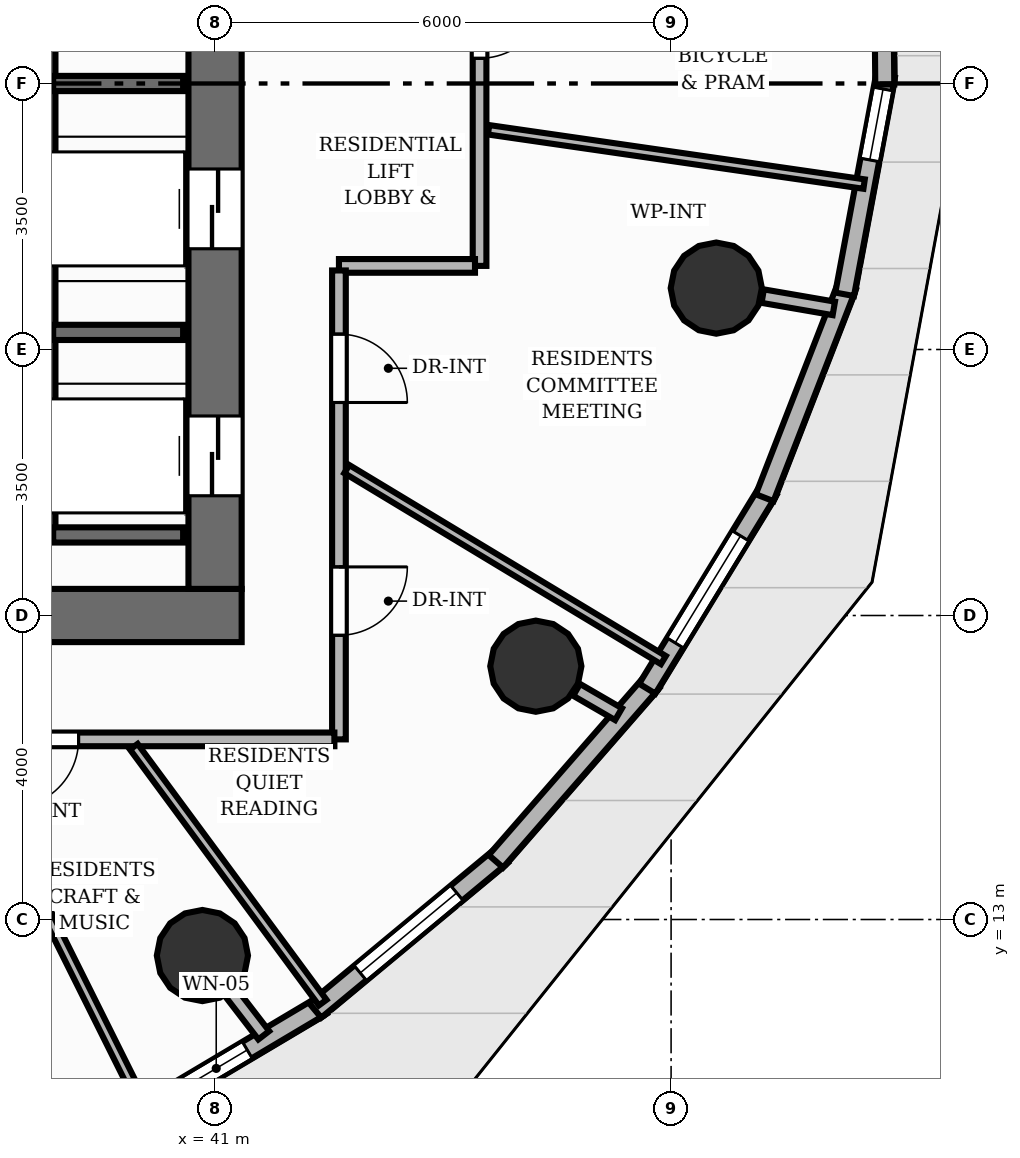
"""IFC4 building model, lengths in metres.
Left out: names, types, materials, properties, quantities, classifications, styles, units other than length and angle.
Written with IfcOpenShell. Run it as: python <this file> out.ifc"""

import sys

from ifc_helpers import new_model, si_unit, direction, frame, frame_2d, origin, origin_2d, place, context, subcontext, project, spatial, rectangle, circle, extrude, element, fill, save


model = new_model("IFC4")
c1 = context("Model", 3, precision=1e-05, world=origin(), true_north=direction((0.0, 1.0)))
c2 = subcontext(c1, "Body", "Model", "MODEL_VIEW")
j1 = project(units=[si_unit("LENGTHUNIT", "METRE"), si_unit("PLANEANGLEUNIT", "RADIAN")], contexts=[c1])
p1 = place(None, origin())
s1 = spatial("IfcSite", under=j1, at=p1, CompositionType="ELEMENT")
p2 = place(p1, origin())
s2 = spatial("IfcBuilding", under=s1, at=p2, CompositionType="ELEMENT")
p3 = place(p2, frame((0.0, 0.0, 74.08)))
s3 = spatial("IfcBuildingStorey", under=s2, at=p3, CompositionType="ELEMENT", Elevation=74.08)
p4 = place(p3, frame((22.65, 17.0, 0.0), z_axis=(0.0, 0.0, 1.0), x_axis=(1.0, 0.0, 0.0)))
e1 = element("IfcWall", 1, at=p4, inside=s3, PredefinedType="SHEAR", context=c2, shape_type="SweptSolid", body=[
    extrude(rectangle(XDim=18.7, YDim=0.7, at=frame_2d((9.35, 0.0))), origin(), (0.0, 0.0, 1.0), 3.2),
])
p5 = place(p4, frame((5.85, 0.0, 0.0)))
e2 = element("IfcOpeningElement", 2, at=p5, cuts=e1, PredefinedType="OPENING", context=c2, shape_type="SweptSolid", body=[
    extrude(rectangle(XDim=1.1, YDim=2.15, at=frame_2d((0.55, 1.075))), frame((0.0, 0.36, 0.0), z_axis=(0.0, -1.0, 0.0), x_axis=(1.0, 0.0, 0.0)), (0.0, 0.0, 1.0), 0.72),
])
p6 = place(p4, frame((9.4, 0.0, 0.0)))
e3 = element("IfcOpeningElement", 3, at=p6, cuts=e1, PredefinedType="OPENING", context=c2, shape_type="SweptSolid", body=[
    extrude(rectangle(XDim=0.9, YDim=2.1, at=frame_2d((0.45, 1.05))), frame((0.0, 0.36, 0.0), z_axis=(0.0, -1.0, 0.0), x_axis=(1.0, 0.0, 0.0)), (0.0, 0.0, 1.0), 0.72),
])
p7 = place(p3, frame((41.0, 17.35, 0.0), z_axis=(0.0, 0.0, 1.0), x_axis=(0.0, 1.0, 0.0)))
e4 = element("IfcWall", 4, at=p7, inside=s3, PredefinedType="SHEAR", context=c2, shape_type="SweptSolid", body=[
    extrude(rectangle(XDim=13.3, YDim=0.7, at=frame_2d((6.65, 0.0))), origin(), (0.0, 0.0, 1.0), 3.2),
])
p8 = place(p7, frame((1.225, 0.0, 0.0)))
e5 = element("IfcOpeningElement", 5, at=p8, cuts=e4, PredefinedType="OPENING", context=c2, shape_type="SweptSolid", body=[
    extrude(rectangle(XDim=1.05, YDim=2.15, at=frame_2d((0.525, 1.075))), frame((0.0, 0.36, 0.0), z_axis=(0.0, -1.0, 0.0), x_axis=(1.0, 0.0, 0.0)), (0.0, 0.0, 1.0), 0.72),
])
p9 = place(p7, frame((4.475, 0.0, 0.0)))
e6 = element("IfcOpeningElement", 6, at=p9, cuts=e4, PredefinedType="OPENING", context=c2, shape_type="SweptSolid", body=[
    extrude(rectangle(XDim=1.05, YDim=2.15, at=frame_2d((0.525, 1.075))), frame((0.0, 0.36, 0.0), z_axis=(0.0, -1.0, 0.0), x_axis=(1.0, 0.0, 0.0)), (0.0, 0.0, 1.0), 0.72),
])
p10 = place(p7, frame((7.775, 0.0, 0.0)))
e7 = element("IfcOpeningElement", 7, at=p10, cuts=e4, PredefinedType="OPENING", context=c2, shape_type="SweptSolid", body=[
    extrude(rectangle(XDim=1.05, YDim=2.15, at=frame_2d((0.525, 1.075))), frame((0.0, 0.36, 0.0), z_axis=(0.0, -1.0, 0.0), x_axis=(1.0, 0.0, 0.0)), (0.0, 0.0, 1.0), 0.72),
])
p11 = place(p7, frame((11.025, 0.0, 0.0)))
e8 = element("IfcOpeningElement", 8, at=p11, cuts=e4, PredefinedType="OPENING", context=c2, shape_type="SweptSolid", body=[
    extrude(rectangle(XDim=1.05, YDim=2.15, at=frame_2d((0.525, 1.075))), frame((0.0, 0.36, 0.0), z_axis=(0.0, -1.0, 0.0), x_axis=(1.0, 0.0, 0.0)), (0.0, 0.0, 1.0), 0.72),
])
for number, where, z_axis, x_axis in (
    (9, (40.833, 12.526, 0.0), (0.0, 0.0, 1.0), (1.0, 0.0, 0.0)),
    (10, (45.22, 16.333, 0.0), (0.0, 0.0, 1.0), (1.0, 0.0, 0.0)),
    (11, (47.594, 21.308, 0.0), (0.0, 0.0, 1.0), (1.0, 0.0, 0.0)),
):
    element("IfcColumn", number, at=place(p3, frame(where, z_axis=z_axis, x_axis=x_axis)), inside=s3, PredefinedType="COLUMN", context=c2, shape_type="SweptSolid", body=[
        extrude(circle(Radius=0.6, at=origin_2d()), origin(), (0.0, 0.0, 1.0), 3.2),
    ])
p12 = place(p3, frame((42.406, 11.868, 0.0), z_axis=(0.0, 0.0, 1.0), x_axis=(-0.859543053771, -0.511063341196, 0.0)))
e12 = element("IfcWall", 12, at=p12, inside=s3, PredefinedType="SOLIDWALL", context=c2, shape_type="SweptSolid", body=[
    extrude(rectangle(XDim=3.236, YDim=0.25, at=frame_2d((1.618, 0.0))), origin(), (0.0, 0.0, 1.0), 2.96),
])
p13 = place(p12, frame((1.143, 0.0, 0.85)))
e13 = element("IfcOpeningElement", 13, at=p13, cuts=e12, PredefinedType="OPENING", context=c2, shape_type="SweptSolid", body=[
    extrude(rectangle(XDim=0.95, YDim=1.37, at=frame_2d((0.475, 0.685))), frame((0.0, 0.135, 0.0), z_axis=(0.0, -1.0, 0.0), x_axis=(1.0, 0.0, 0.0)), (0.0, 0.0, 1.0), 0.27),
])
p14 = place(p3, frame((44.773, 13.843, 0.0), z_axis=(0.0, 0.0, 1.0), x_axis=(-0.769611275013, -0.638512713557, 0.0)))
e14 = element("IfcWall", 14, at=p14, inside=s3, PredefinedType="SOLIDWALL", context=c2, shape_type="SweptSolid", body=[
    extrude(rectangle(XDim=3.192, YDim=0.25, at=frame_2d((1.596, 0.0))), origin(), (0.0, 0.0, 1.0), 2.96),
])
p15 = place(p14, frame((0.771, 0.0, 0.85)))
e15 = element("IfcOpeningElement", 15, at=p15, cuts=e14, PredefinedType="OPENING", context=c2, shape_type="SweptSolid", body=[
    extrude(rectangle(XDim=1.65, YDim=1.55, at=frame_2d((0.825, 0.775))), frame((0.0, 0.135, 0.0), z_axis=(0.0, -1.0, 0.0), x_axis=(1.0, 0.0, 0.0)), (0.0, 0.0, 1.0), 0.27),
])
p16 = place(p3, frame((46.752, 16.127, 0.0), z_axis=(0.0, 0.0, 1.0), x_axis=(-0.656940925155, -0.753942054044, 0.0)))
e16 = element("IfcWall", 16, at=p16, inside=s3, PredefinedType="SOLIDWALL", context=c2, shape_type="SweptSolid", body=[
    extrude(rectangle(XDim=3.131, YDim=0.25, at=frame_2d((1.565, 0.0))), origin(), (0.0, 0.0, 1.0), 2.96),
])
p17 = place(p3, frame((48.281, 18.65, 0.0), z_axis=(0.0, 0.0, 1.0), x_axis=(-0.520956264952, -0.853583370273, 0.0)))
e17 = element("IfcWall", 17, at=p17, inside=s3, PredefinedType="SOLIDWALL", context=c2, shape_type="SweptSolid", body=[
    extrude(rectangle(XDim=3.061, YDim=0.25, at=frame_2d((1.53, 0.0))), origin(), (0.0, 0.0, 1.0), 2.96),
])
p18 = place(p17, frame((0.705, 0.0, 0.85)))
e18 = element("IfcOpeningElement", 18, at=p18, cuts=e17, PredefinedType="OPENING", context=c2, shape_type="SweptSolid", body=[
    extrude(rectangle(XDim=1.65, YDim=1.55, at=frame_2d((0.825, 0.775))), frame((0.0, 0.135, 0.0), z_axis=(0.0, -1.0, 0.0), x_axis=(1.0, 0.0, 0.0)), (0.0, 0.0, 1.0), 0.27),
])
p19 = place(p3, frame((49.314, 21.335, 0.0), z_axis=(0.0, 0.0, 1.0), x_axis=(-0.362414720493, -0.93201693674, 0.0)))
e19 = element("IfcWall", 19, at=p19, inside=s3, PredefinedType="SOLIDWALL", context=c2, shape_type="SweptSolid", body=[
    extrude(rectangle(XDim=2.988, YDim=0.25, at=frame_2d((1.494, 0.0))), origin(), (0.0, 0.0, 1.0), 2.96),
])
p20 = place(p3, frame((49.821, 24.1, 0.0), z_axis=(0.0, 0.0, 1.0), x_axis=(-0.183975908968, -0.982930752861, 0.0)))
e20 = element("IfcWall", 20, at=p20, inside=s3, PredefinedType="SOLIDWALL", context=c2, shape_type="SweptSolid", body=[
    extrude(rectangle(XDim=2.923, YDim=0.25, at=frame_2d((1.462, 0.0))), origin(), (0.0, 0.0, 1.0), 2.96),
])
p21 = place(p20, frame((0.175, 0.0, 0.85)))
e21 = element("IfcOpeningElement", 21, at=p21, cuts=e20, PredefinedType="OPENING", context=c2, shape_type="SweptSolid", body=[
    extrude(rectangle(XDim=0.95, YDim=1.45, at=frame_2d((0.475, 0.725))), frame((0.0, 0.135, 0.0), z_axis=(0.0, -1.0, 0.0), x_axis=(1.0, 0.0, 0.0)), (0.0, 0.0, 1.0), 0.27),
])
p22 = place(p3, frame((49.787, 26.861, 0.0), z_axis=(0.0, 0.0, 1.0), x_axis=(0.008580093639, -0.999963190319, 0.0)))
e22 = element("IfcWall", 22, at=p22, inside=s3, PredefinedType="SOLIDWALL", context=c2, shape_type="SweptSolid", body=[
    extrude(rectangle(XDim=2.874, YDim=0.25, at=frame_2d((1.437, 0.0))), origin(), (0.0, 0.0, 1.0), 2.96),
])
p23 = place(p3, frame((38.8, 18.06, 0.0), z_axis=(0.0, 0.0, 1.0), x_axis=(0.0, 1.0, 0.0)))
e23 = element("IfcWall", 23, at=p23, inside=s3, PredefinedType="SHEAR", context=c2, shape_type="SweptSolid", body=[
    extrude(rectangle(XDim=11.88, YDim=0.2, at=frame_2d((5.94, 0.0))), origin(), (0.0, 0.0, 1.0), 3.2),
])
for number, where, z_axis, x_axis in (
    (24, (38.87, 18.06, 0.0), (0.0, 0.0, 1.0), (1.0, 0.0, 0.0)),
    (25, (38.87, 20.725, 0.0), (0.0, 0.0, 1.0), (1.0, 0.0, 0.0)),
    (26, (38.87, 24.0, 0.0), (0.0, 0.0, 1.0), (1.0, 0.0, 0.0)),
):
    element("IfcWall", number, at=place(p3, frame(where, z_axis=z_axis, x_axis=x_axis)), inside=s3, PredefinedType="SHEAR", context=c2, shape_type="SweptSolid", body=[
        extrude(rectangle(XDim=1.71, YDim=0.2, at=frame_2d((0.855, 0.0))), origin(), (0.0, 0.0, 1.0), 3.2),
    ])
p24 = place(p3, frame((41.212, 12.034, 0.0), z_axis=(0.0, 0.0, 1.0), x_axis=(0.609945476355, -0.792443383387, 0.0)))
e27 = element("IfcWall", 27, at=p24, inside=s3, PredefinedType="PARTITIONING", context=c2, shape_type="SweptSolid", body=[
    extrude(rectangle(XDim=0.704, YDim=0.18, at=frame_2d((0.352, 0.0))), origin(), (0.0, 0.0, 1.0), 2.26),
])
p25 = place(p3, frame((45.757, 16.022, 0.0), z_axis=(0.0, 0.0, 1.0), x_axis=(0.864928236137, -0.501895553212, 0.0)))
e28 = element("IfcWall", 28, at=p25, inside=s3, PredefinedType="PARTITIONING", context=c2, shape_type="SweptSolid", body=[
    extrude(rectangle(XDim=0.638, YDim=0.18, at=frame_2d((0.319, 0.0))), origin(), (0.0, 0.0, 1.0), 2.26),
])
p26 = place(p3, frame((48.206, 21.202, 0.0), z_axis=(0.0, 0.0, 1.0), x_axis=(0.985396187556, -0.170277284302, 0.0)))
e29 = element("IfcWall", 29, at=p26, inside=s3, PredefinedType="PARTITIONING", context=c2, shape_type="SweptSolid", body=[
    extrude(rectangle(XDim=0.949, YDim=0.18, at=frame_2d((0.475, 0.0))), origin(), (0.0, 0.0, 1.0), 2.26),
])
p27 = place(p3, frame((44.48, 26.4, 0.0), z_axis=(0.0, 0.0, 1.0), x_axis=(0.0, -1.0, 0.0)))
e30 = element("IfcWall", 30, at=p27, inside=s3, PredefinedType="PARTITIONING", context=c2, shape_type="SweptSolid", body=[
    extrude(rectangle(XDim=4.8, YDim=0.18, at=frame_2d((2.4, 0.0))), origin(), (0.0, 0.0, 1.0), 2.955),
])
p28 = place(p27, frame((1.169, 0.0, 0.0)))
e31 = element("IfcOpeningElement", 31, at=p28, cuts=e30, PredefinedType="OPENING", context=c2, shape_type="SweptSolid", body=[
    extrude(rectangle(XDim=0.9, YDim=2.1, at=frame_2d((0.45, 1.05))), frame((0.0, 0.1, 0.0), z_axis=(0.0, -1.0, 0.0), x_axis=(1.0, 0.0, 0.0)), (0.0, 0.0, 1.0), 0.2),
])
p29 = place(p3, frame((44.42, 21.6, 0.0), z_axis=(0.0, 0.0, 1.0), x_axis=(-1.0, 0.0, 0.0)))
e32 = element("IfcWall", 32, at=p29, inside=s3, PredefinedType="PARTITIONING", context=c2, shape_type="SweptSolid", body=[
    extrude(rectangle(XDim=1.79, YDim=0.18, at=frame_2d((0.895, 0.0))), origin(), (0.0, 0.0, 1.0), 2.26),
])
p30 = place(p3, frame((42.63, 21.54, 0.0), z_axis=(0.0, 0.0, 1.0), x_axis=(0.0, -1.0, 0.0)))
e33 = element("IfcWall", 33, at=p30, inside=s3, PredefinedType="PARTITIONING", context=c2, shape_type="SweptSolid", body=[
    extrude(rectangle(XDim=6.17, YDim=0.18, at=frame_2d((3.085, 0.0))), origin(), (0.0, 0.0, 1.0), 2.955),
])
p31 = place(p30, frame((0.837, 0.0, 0.0)))
e34 = element("IfcOpeningElement", 34, at=p31, cuts=e33, PredefinedType="OPENING", context=c2, shape_type="SweptSolid", body=[
    extrude(rectangle(XDim=0.9, YDim=2.1, at=frame_2d((0.45, 1.05))), frame((0.0, 0.1, 0.0), z_axis=(0.0, -1.0, 0.0), x_axis=(1.0, 0.0, 0.0)), (0.0, 0.0, 1.0), 0.2),
])
p32 = place(p30, frame((3.901, 0.0, 0.0)))
e35 = element("IfcOpeningElement", 35, at=p32, cuts=e33, PredefinedType="OPENING", context=c2, shape_type="SweptSolid", body=[
    extrude(rectangle(XDim=0.9, YDim=2.1, at=frame_2d((0.45, 1.05))), frame((0.0, 0.1, 0.0), z_axis=(0.0, -1.0, 0.0), x_axis=(1.0, 0.0, 0.0)), (0.0, 0.0, 1.0), 0.2),
])
p33 = place(p3, frame((42.57, 15.37, 0.0), z_axis=(0.0, 0.0, 1.0), x_axis=(-1.0, 0.0, 0.0)))
e36 = element("IfcWall", 36, at=p33, inside=s3, PredefinedType="PARTITIONING", context=c2, shape_type="SweptSolid", body=[
    extrude(rectangle(XDim=11.879, YDim=0.18, at=frame_2d((5.939, 0.0))), origin(), (0.0, 0.0, 1.0), 2.955),
])
p34 = place(p33, frame((3.365, 0.0, 0.0)))
e37 = element("IfcOpeningElement", 37, at=p34, cuts=e36, PredefinedType="OPENING", context=c2, shape_type="SweptSolid", body=[
    extrude(rectangle(XDim=0.9, YDim=2.1, at=frame_2d((0.45, 1.05))), frame((0.0, 0.1, 0.0), z_axis=(0.0, -1.0, 0.0), x_axis=(1.0, 0.0, 0.0)), (0.0, 0.0, 1.0), 0.2),
])
p35 = place(p33, frame((6.308, 0.0, 0.0)))
e38 = element("IfcOpeningElement", 38, at=p35, cuts=e36, PredefinedType="OPENING", context=c2, shape_type="SweptSolid", body=[
    extrude(rectangle(XDim=0.9, YDim=2.1, at=frame_2d((0.45, 1.05))), frame((0.0, 0.1, 0.0), z_axis=(0.0, -1.0, 0.0), x_axis=(1.0, 0.0, 0.0)), (0.0, 0.0, 1.0), 0.2),
])
p36 = place(p3, frame((49.54, 22.677, 0.0), z_axis=(0.0, 0.0, 1.0), x_axis=(-0.989708433574, 0.143098625124, 0.0)))
e39 = element("IfcWall", 39, at=p36, inside=s3, PredefinedType="PARTITIONING", context=c2, shape_type="SweptSolid", body=[
    extrude(rectangle(XDim=4.992, YDim=0.125, at=frame_2d((2.496, 0.0))), origin(), (0.0, 0.0, 1.0), 2.641),
])
p37 = place(p3, frame((46.898, 16.414, 0.0), z_axis=(0.0, 0.0, 1.0), x_axis=(-0.856255019026, 0.51655332967, 0.0)))
e40 = element("IfcWall", 40, at=p37, inside=s3, PredefinedType="PARTITIONING", context=c2, shape_type="SweptSolid", body=[
    extrude(rectangle(XDim=4.865, YDim=0.125, at=frame_2d((2.432, 0.0))), origin(), (0.0, 0.0, 1.0), 2.955),
])
p38 = place(p3, frame((42.416, 11.906, 0.0), z_axis=(0.0, 0.0, 1.0), x_axis=(-0.593774058598, 0.804631820981, 0.0)))
e41 = element("IfcWall", 41, at=p38, inside=s3, PredefinedType="PARTITIONING", context=c2, shape_type="SweptSolid", body=[
    extrude(rectangle(XDim=4.185, YDim=0.125, at=frame_2d((2.092, 0.0))), origin(), (0.0, 0.0, 1.0), 2.955),
])
p39 = place(p3, frame((40.073, 10.498, 0.0), z_axis=(0.0, 0.0, 1.0), x_axis=(-0.446241148369, 0.894912754129, 0.0)))
e42 = element("IfcWall", 42, at=p39, inside=s3, PredefinedType="PARTITIONING", context=c2, shape_type="SweptSolid", body=[
    extrude(rectangle(XDim=5.324, YDim=0.125, at=frame_2d((2.662, 0.0))), origin(), (0.0, 0.0, 1.0), 2.955),
])
p40 = place(p13, origin())
e43 = element("IfcWindow", 43, at=p40, inside=s3, PartitioningType="SINGLE_PANEL", PredefinedType="WINDOW", context=c2, shape_type="SweptSolid", body=[
    extrude(rectangle(XDim=0.95, YDim=1.37, at=frame_2d((0.475, 0.685))), frame((0.0, 0.03, 0.0), z_axis=(0.0, -1.0, 0.0), x_axis=(1.0, 0.0, 0.0)), (0.0, 0.0, 1.0), 0.06),
])
fill(e13, e43)
p41 = place(p15, origin())
e44 = element("IfcWindow", 44, at=p41, inside=s3, PartitioningType="SINGLE_PANEL", PredefinedType="WINDOW", context=c2, shape_type="SweptSolid", body=[
    extrude(rectangle(XDim=1.65, YDim=1.55, at=frame_2d((0.825, 0.775))), frame((0.0, 0.03, 0.0), z_axis=(0.0, -1.0, 0.0), x_axis=(1.0, 0.0, 0.0)), (0.0, 0.0, 1.0), 0.06),
])
fill(e15, e44)
p42 = place(p18, origin())
e45 = element("IfcWindow", 45, at=p42, inside=s3, PartitioningType="SINGLE_PANEL", PredefinedType="WINDOW", context=c2, shape_type="SweptSolid", body=[
    extrude(rectangle(XDim=1.65, YDim=1.55, at=frame_2d((0.825, 0.775))), frame((0.0, 0.03, 0.0), z_axis=(0.0, -1.0, 0.0), x_axis=(1.0, 0.0, 0.0)), (0.0, 0.0, 1.0), 0.06),
])
fill(e18, e45)
p43 = place(p21, origin())
e46 = element("IfcWindow", 46, at=p43, inside=s3, PartitioningType="SINGLE_PANEL", PredefinedType="WINDOW", context=c2, shape_type="SweptSolid", body=[
    extrude(rectangle(XDim=0.95, YDim=1.45, at=frame_2d((0.475, 0.725))), frame((0.0, 0.03, 0.0), z_axis=(0.0, -1.0, 0.0), x_axis=(1.0, 0.0, 0.0)), (0.0, 0.0, 1.0), 0.06),
])
fill(e21, e46)
p44 = place(p8, origin())
e47 = element("IfcDoor", 47, at=p44, inside=s3, OperationType="DOUBLE_DOOR_SLIDING", PredefinedType="DOOR", context=c2, shape_type="SweptSolid", body=[
    extrude(rectangle(XDim=1.05, YDim=2.15, at=frame_2d((0.525, 1.075))), frame((0.0, 0.025, 0.0), z_axis=(0.0, -1.0, 0.0), x_axis=(1.0, 0.0, 0.0)), (0.0, 0.0, 1.0), 0.05),
])
fill(e5, e47)
p45 = place(p9, origin())
e48 = element("IfcDoor", 48, at=p45, inside=s3, OperationType="DOUBLE_DOOR_SLIDING", PredefinedType="DOOR", context=c2, shape_type="SweptSolid", body=[
    extrude(rectangle(XDim=1.05, YDim=2.15, at=frame_2d((0.525, 1.075))), frame((0.0, 0.025, 0.0), z_axis=(0.0, -1.0, 0.0), x_axis=(1.0, 0.0, 0.0)), (0.0, 0.0, 1.0), 0.05),
])
fill(e6, e48)
p46 = place(p28, origin())
e49 = element("IfcDoor", 49, at=p46, inside=s3, OperationType="SINGLE_SWING_LEFT", PredefinedType="DOOR", context=c2, shape_type="SweptSolid", body=[
    extrude(rectangle(XDim=0.9, YDim=2.1, at=frame_2d((0.45, 1.05))), frame((0.0, 0.025, 0.0), z_axis=(0.0, -1.0, 0.0), x_axis=(1.0, 0.0, 0.0)), (0.0, 0.0, 1.0), 0.05),
])
fill(e31, e49)
p47 = place(p31, origin())
e50 = element("IfcDoor", 50, at=p47, inside=s3, OperationType="SINGLE_SWING_RIGHT", PredefinedType="DOOR", context=c2, shape_type="SweptSolid", body=[
    extrude(rectangle(XDim=0.9, YDim=2.1, at=frame_2d((0.45, 1.05))), frame((0.0, 0.025, 0.0), z_axis=(0.0, -1.0, 0.0), x_axis=(1.0, 0.0, 0.0)), (0.0, 0.0, 1.0), 0.05),
])
fill(e34, e50)
p48 = place(p32, origin())
e51 = element("IfcDoor", 51, at=p48, inside=s3, OperationType="SINGLE_SWING_LEFT", PredefinedType="DOOR", context=c2, shape_type="SweptSolid", body=[
    extrude(rectangle(XDim=0.9, YDim=2.1, at=frame_2d((0.45, 1.05))), frame((0.0, 0.025, 0.0), z_axis=(0.0, -1.0, 0.0), x_axis=(1.0, 0.0, 0.0)), (0.0, 0.0, 1.0), 0.05),
])
fill(e35, e51)
p49 = place(p34, origin())
e52 = element("IfcDoor", 52, at=p49, inside=s3, OperationType="SINGLE_SWING_RIGHT", PredefinedType="DOOR", context=c2, shape_type="SweptSolid", body=[
    extrude(rectangle(XDim=0.9, YDim=2.1, at=frame_2d((0.45, 1.05))), frame((0.0, 0.025, 0.0), z_axis=(0.0, -1.0, 0.0), x_axis=(1.0, 0.0, 0.0)), (0.0, 0.0, 1.0), 0.05),
])
fill(e37, e52)
save(model, sys.argv[1])
